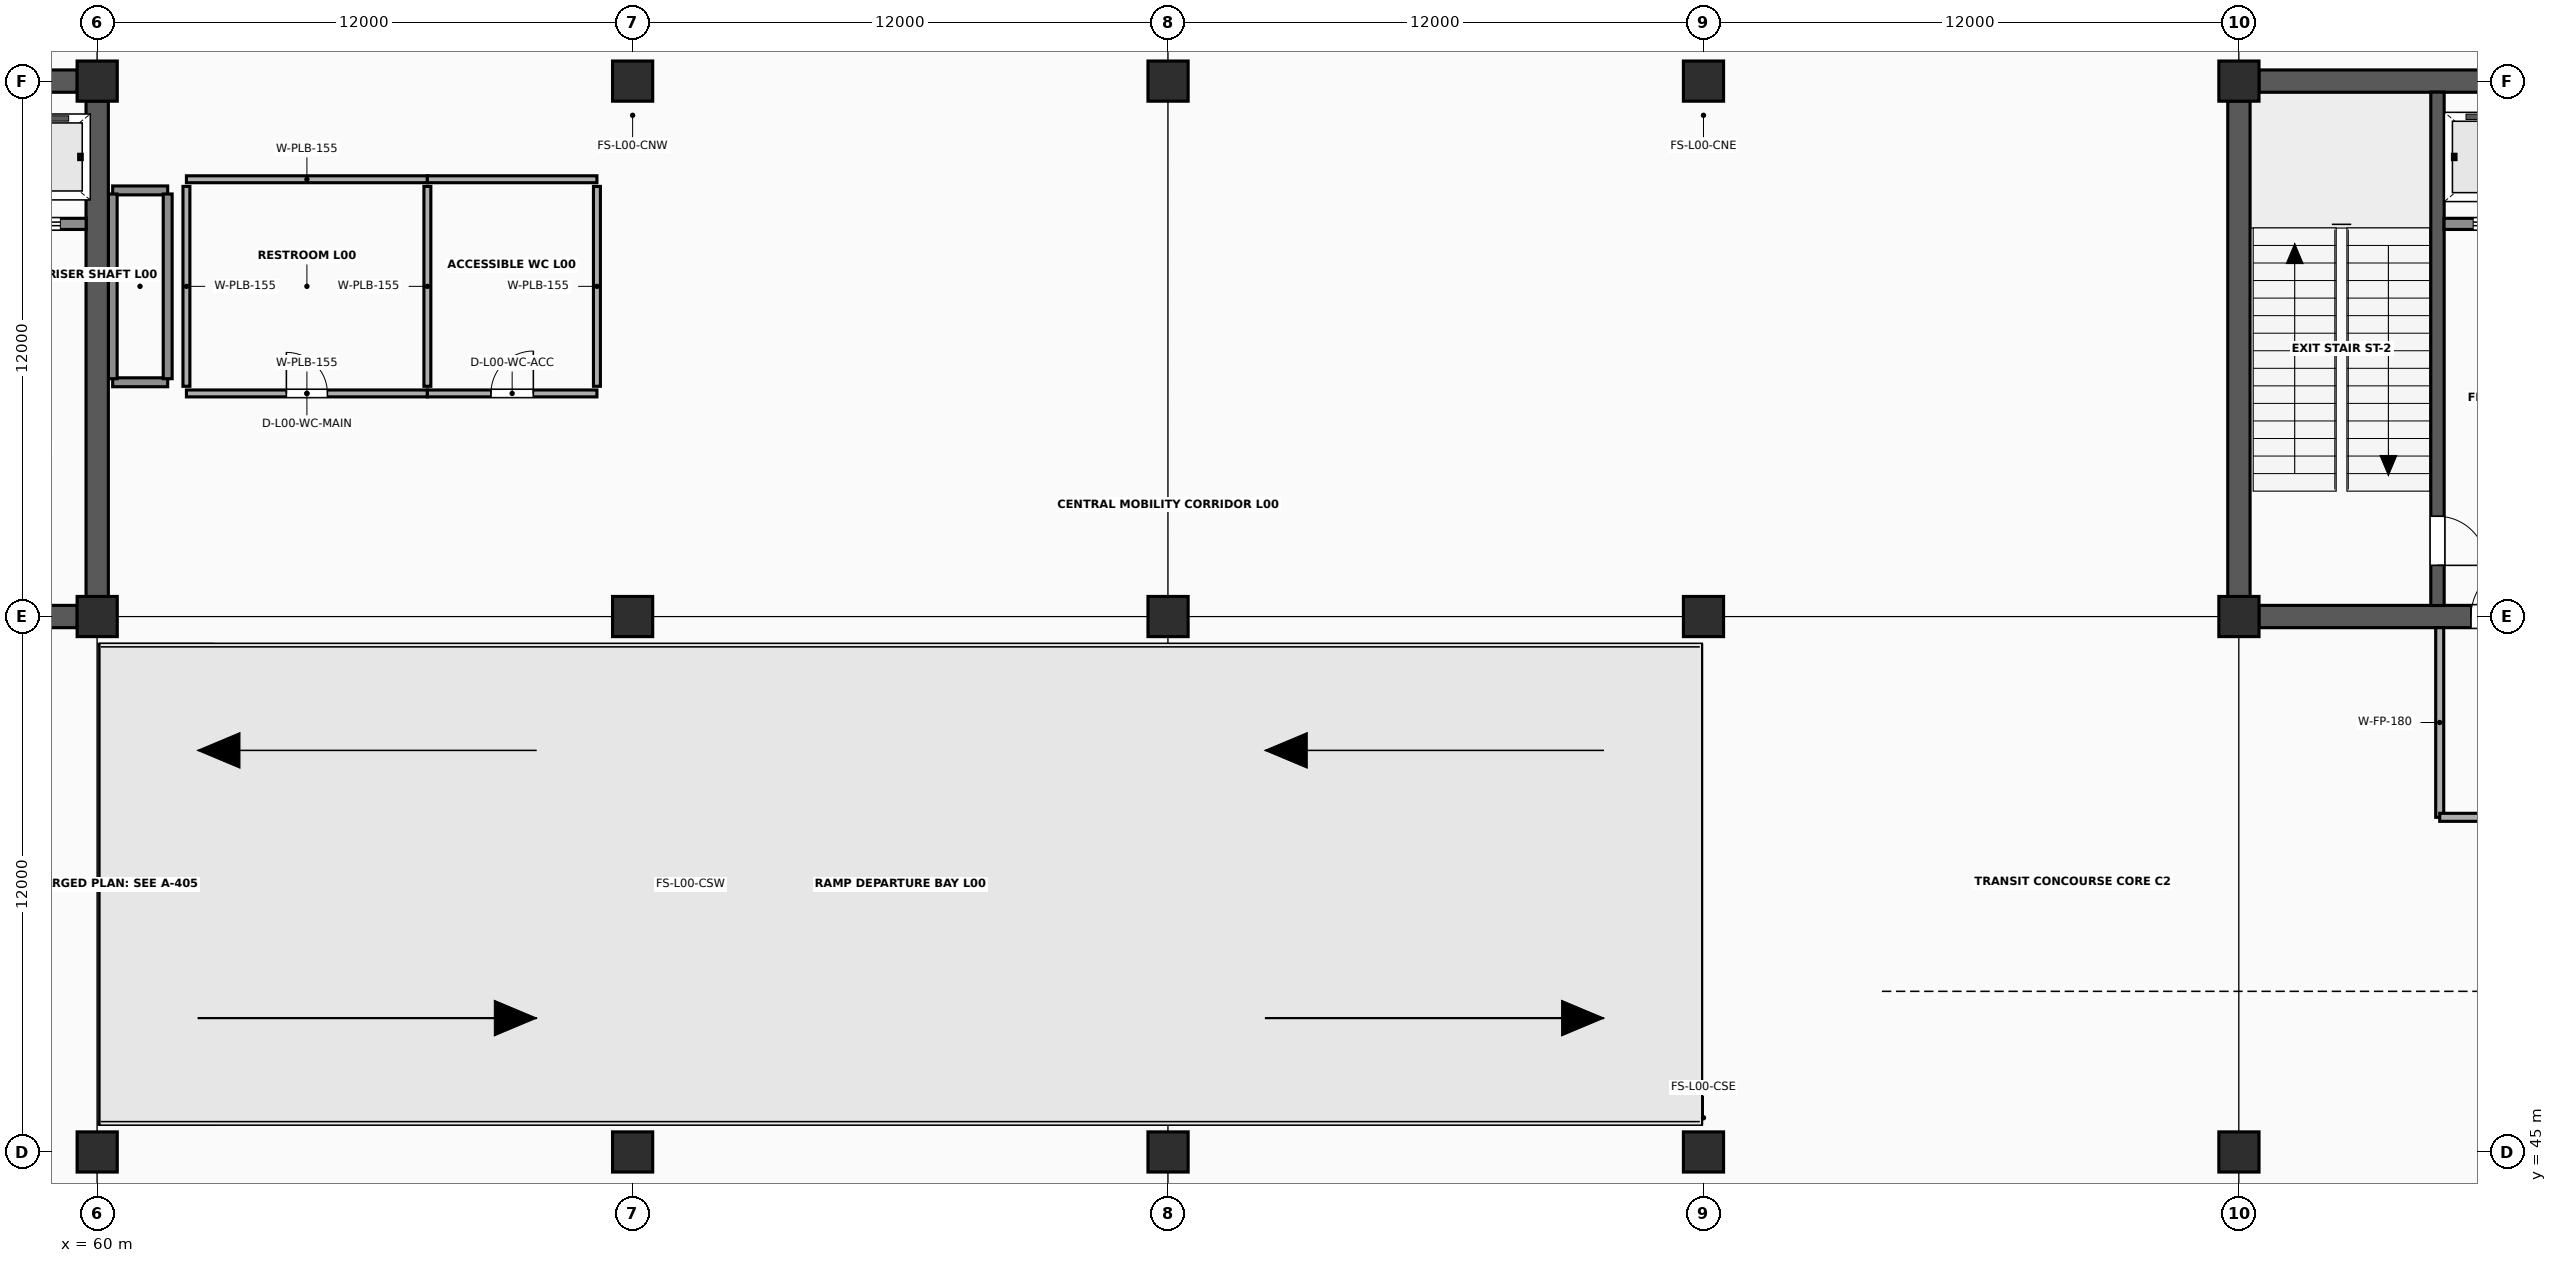
"""IFC4 building model, lengths in metres.
Left out: names, types, materials, properties, quantities, classifications, styles, units other than length and angle.
Written with IfcOpenShell. Run it as: python <this file> out.ifc"""

import sys

from ifc_helpers import new_model, si_unit, direction, frame, frame_2d, origin, origin_2d, place, context, subcontext, project, spatial, rectangle, extrude, element, fill, save


model = new_model("IFC4")
c1 = context("Model", 3, precision=1e-05, world=origin(), true_north=direction((0.0, 1.0)))
c2 = subcontext(c1, "Body", "Model", "MODEL_VIEW")
j1 = project(units=[si_unit("LENGTHUNIT", "METRE"), si_unit("PLANEANGLEUNIT", "RADIAN")], contexts=[c1])
p1 = place(None, origin())
s1 = spatial("IfcSite", under=j1, at=p1, CompositionType="ELEMENT")
p2 = place(p1, origin())
s2 = spatial("IfcBuilding", under=s1, at=p2, CompositionType="ELEMENT")
p3 = place(p2, origin())
s3 = spatial("IfcBuildingStorey", under=s2, at=p3, CompositionType="ELEMENT", Elevation=0.0)
for number, where, z_axis, x_axis in (
    (1, (60.0, 45.0, 0.0), (0.0, 0.0, 1.0), (1.0, 0.0, 0.0)),
    (2, (60.0, 57.0, 0.0), (0.0, 0.0, 1.0), (1.0, 0.0, 0.0)),
    (3, (60.0, 69.0, 0.0), (0.0, 0.0, 1.0), (1.0, 0.0, 0.0)),
    (4, (72.0, 45.0, 0.0), (0.0, 0.0, 1.0), (1.0, 0.0, 0.0)),
    (5, (72.0, 57.0, 0.0), (0.0, 0.0, 1.0), (1.0, 0.0, 0.0)),
    (6, (72.0, 69.0, 0.0), (0.0, 0.0, 1.0), (1.0, 0.0, 0.0)),
    (7, (84.0, 45.0, 0.0), (0.0, 0.0, 1.0), (1.0, 0.0, 0.0)),
    (8, (84.0, 57.0, 0.0), (0.0, 0.0, 1.0), (1.0, 0.0, 0.0)),
    (9, (84.0, 69.0, 0.0), (0.0, 0.0, 1.0), (1.0, 0.0, 0.0)),
    (10, (96.0, 45.0, 0.0), (0.0, 0.0, 1.0), (1.0, 0.0, 0.0)),
    (11, (96.0, 57.0, 0.0), (0.0, 0.0, 1.0), (1.0, 0.0, 0.0)),
    (12, (96.0, 69.0, 0.0), (0.0, 0.0, 1.0), (1.0, 0.0, 0.0)),
    (13, (108.0, 45.0, 0.0), (0.0, 0.0, 1.0), (1.0, 0.0, 0.0)),
    (14, (108.0, 57.0, 0.0), (0.0, 0.0, 1.0), (1.0, 0.0, 0.0)),
    (15, (108.0, 69.0, 0.0), (0.0, 0.0, 1.0), (1.0, 0.0, 0.0)),
):
    element("IfcColumn", number, at=place(p3, frame(where, z_axis=z_axis, x_axis=x_axis)), inside=s3, PredefinedType="COLUMN", context=c2, shape_type="SweptSolid", body=[
        extrude(rectangle(XDim=0.9, YDim=0.9, at=origin_2d()), origin(), (0.0, 0.0, 1.0), 5.4),
    ])
for number, where, z_axis, x_axis in (
    (16, (60.347, 62.25, 0.0), (0.0, 0.0, 1.0), (1.0, 0.0, 0.0)),
    (17, (60.347, 66.55, 0.0), (0.0, 0.0, 1.0), (1.0, 0.0, 0.0)),
):
    element("IfcWall", number, at=place(p3, frame(where, z_axis=z_axis, x_axis=x_axis)), inside=s3, PredefinedType="SOLIDWALL", context=c2, shape_type="SweptSolid", body=[
        extrude(rectangle(XDim=1.233, YDim=0.2, at=frame_2d((0.617, 0.0))), origin(), (0.0, 0.0, 1.0), 5.203),
    ])
for number, where, z_axis, x_axis in (
    (18, (60.347, 62.33, 0.0), (0.0, 0.0, 1.0), (0.0, 1.0, 0.0)),
    (19, (61.58, 62.33, 0.0), (0.0, 0.0, 1.0), (0.0, 1.0, 0.0)),
):
    element("IfcWall", number, at=place(p3, frame(where, z_axis=z_axis, x_axis=x_axis)), inside=s3, PredefinedType="SOLIDWALL", context=c2, shape_type="SweptSolid", body=[
        extrude(rectangle(XDim=4.14, YDim=0.2, at=frame_2d((2.07, 0.0))), origin(), (0.0, 0.0, 1.0), 5.203),
    ])
p4 = place(p3, frame((48.447, 57.0, 0.0), z_axis=(0.0, 0.0, 1.0), x_axis=(1.0, 0.0, 0.0)))
e20 = element("IfcWall", 20, at=p4, inside=s3, PredefinedType="SHEAR", context=c2, shape_type="SweptSolid", body=[
    extrude(rectangle(XDim=11.106, YDim=0.5, at=frame_2d((5.553, 0.0))), origin(), (0.0, 0.0, 1.0), 5.203),
])
p5 = place(p4, frame((4.753, 0.0, 0.0)))
e21 = element("IfcOpeningElement", 21, at=p5, cuts=e20, PredefinedType="OPENING", context=c2, shape_type="SweptSolid", body=[
    extrude(rectangle(XDim=1.2, YDim=2.2, at=frame_2d((0.6, 1.1))), frame((0.0, 0.265, 0.0), z_axis=(0.0, -1.0, 0.0), x_axis=(1.0, 0.0, 0.0)), (0.0, 0.0, 1.0), 0.53),
])
p6 = place(p4, frame((8.453, 0.0, 0.0)))
e22 = element("IfcOpeningElement", 22, at=p6, cuts=e20, PredefinedType="OPENING", context=c2, shape_type="SweptSolid", body=[
    extrude(rectangle(XDim=1.5, YDim=2.25, at=frame_2d((0.75, 1.125))), frame((0.0, 0.265, 0.0), z_axis=(0.0, -1.0, 0.0), x_axis=(1.0, 0.0, 0.0)), (0.0, 0.0, 1.0), 0.53),
])
for number, where, z_axis, x_axis in (
    (23, (48.447, 69.0, 0.0), (0.0, 0.0, 1.0), (1.0, 0.0, 0.0)),
    (24, (60.0, 57.447, 0.0), (0.0, 0.0, 1.0), (0.0, 1.0, 0.0)),
):
    element("IfcWall", number, at=place(p3, frame(where, z_axis=z_axis, x_axis=x_axis)), inside=s3, PredefinedType="SHEAR", context=c2, shape_type="SweptSolid", body=[
        extrude(rectangle(XDim=11.106, YDim=0.5, at=frame_2d((5.553, 0.0))), origin(), (0.0, 0.0, 1.0), 5.203),
    ])
p7 = place(p3, frame((52.597, 65.8, 0.0), z_axis=(0.0, 0.0, 1.0), x_axis=(1.0, 0.0, 0.0)))
e25 = element("IfcWall", 25, at=p7, inside=s3, PredefinedType="SOLIDWALL", context=c2, shape_type="SweptSolid", body=[
    extrude(rectangle(XDim=7.156, YDim=0.25, at=frame_2d((3.578, 0.0))), origin(), (0.0, 0.0, 1.0), 5.203),
])
p8 = place(p7, frame((0.653, 0.0, 0.0)))
e26 = element("IfcOpeningElement", 26, at=p8, cuts=e25, PredefinedType="OPENING", context=c2, shape_type="SweptSolid", body=[
    extrude(rectangle(XDim=1.1, YDim=2.24, at=frame_2d((0.55, 1.12))), frame((0.0, 0.14, 0.0), z_axis=(0.0, -1.0, 0.0), x_axis=(1.0, 0.0, 0.0)), (0.0, 0.0, 1.0), 0.28),
])
p9 = place(p7, frame((3.153, 0.0, 0.0)))
e27 = element("IfcOpeningElement", 27, at=p9, cuts=e25, PredefinedType="OPENING", context=c2, shape_type="SweptSolid", body=[
    extrude(rectangle(XDim=1.05, YDim=2.2, at=frame_2d((0.525, 1.1))), frame((0.0, 0.14, 0.0), z_axis=(0.0, -1.0, 0.0), x_axis=(1.0, 0.0, 0.0)), (0.0, 0.0, 1.0), 0.28),
])
p10 = place(p7, frame((5.528, 0.0, 0.0)))
e28 = element("IfcOpeningElement", 28, at=p10, cuts=e25, PredefinedType="OPENING", context=c2, shape_type="SweptSolid", body=[
    extrude(rectangle(XDim=1.05, YDim=2.2, at=frame_2d((0.525, 1.1))), frame((0.0, 0.14, 0.0), z_axis=(0.0, -1.0, 0.0), x_axis=(1.0, 0.0, 0.0)), (0.0, 0.0, 1.0), 0.28),
])
p11 = place(p3, frame((108.447, 57.0, 0.0), z_axis=(0.0, 0.0, 1.0), x_axis=(1.0, 0.0, 0.0)))
e29 = element("IfcWall", 29, at=p11, inside=s3, PredefinedType="SHEAR", context=c2, shape_type="SweptSolid", body=[
    extrude(rectangle(XDim=11.106, YDim=0.5, at=frame_2d((5.553, 0.0))), origin(), (0.0, 0.0, 1.0), 5.203),
])
p12 = place(p11, frame((4.753, 0.0, 0.0)))
e30 = element("IfcOpeningElement", 30, at=p12, cuts=e29, PredefinedType="OPENING", context=c2, shape_type="SweptSolid", body=[
    extrude(rectangle(XDim=1.2, YDim=2.2, at=frame_2d((0.6, 1.1))), frame((0.0, 0.265, 0.0), z_axis=(0.0, -1.0, 0.0), x_axis=(1.0, 0.0, 0.0)), (0.0, 0.0, 1.0), 0.53),
])
p13 = place(p11, frame((8.453, 0.0, 0.0)))
e31 = element("IfcOpeningElement", 31, at=p13, cuts=e29, PredefinedType="OPENING", context=c2, shape_type="SweptSolid", body=[
    extrude(rectangle(XDim=1.5, YDim=2.25, at=frame_2d((0.75, 1.125))), frame((0.0, 0.265, 0.0), z_axis=(0.0, -1.0, 0.0), x_axis=(1.0, 0.0, 0.0)), (0.0, 0.0, 1.0), 0.53),
])
for number, where, z_axis, x_axis in (
    (32, (108.447, 69.0, 0.0), (0.0, 0.0, 1.0), (1.0, 0.0, 0.0)),
    (33, (108.0, 57.447, 0.0), (0.0, 0.0, 1.0), (0.0, 1.0, 0.0)),
):
    element("IfcWall", number, at=place(p3, frame(where, z_axis=z_axis, x_axis=x_axis)), inside=s3, PredefinedType="SHEAR", context=c2, shape_type="SweptSolid", body=[
        extrude(rectangle(XDim=11.106, YDim=0.5, at=frame_2d((5.553, 0.0))), origin(), (0.0, 0.0, 1.0), 5.203),
    ])
p14 = place(p3, frame((112.45, 57.247, 0.0), z_axis=(0.0, 0.0, 1.0), x_axis=(0.0, 1.0, 0.0)))
e34 = element("IfcWall", 34, at=p14, inside=s3, PredefinedType="SHEAR", context=c2, shape_type="SweptSolid", body=[
    extrude(rectangle(XDim=11.506, YDim=0.3, at=frame_2d((5.753, 0.0))), origin(), (0.0, 0.0, 1.0), 5.203),
])
p15 = place(p14, frame((0.9, 0.0, 0.0)))
e35 = element("IfcOpeningElement", 35, at=p15, cuts=e34, PredefinedType="OPENING", context=c2, shape_type="SweptSolid", body=[
    extrude(rectangle(XDim=1.1, YDim=2.2, at=frame_2d((0.55, 1.1))), frame((0.0, 0.165, 0.0), z_axis=(0.0, -1.0, 0.0), x_axis=(1.0, 0.0, 0.0)), (0.0, 0.0, 1.0), 0.33),
])
p16 = place(p3, frame((112.597, 65.8, 0.0), z_axis=(0.0, 0.0, 1.0), x_axis=(1.0, 0.0, 0.0)))
e36 = element("IfcWall", 36, at=p16, inside=s3, PredefinedType="SOLIDWALL", context=c2, shape_type="SweptSolid", body=[
    extrude(rectangle(XDim=7.156, YDim=0.25, at=frame_2d((3.578, 0.0))), origin(), (0.0, 0.0, 1.0), 5.203),
])
p17 = place(p16, frame((0.653, 0.0, 0.0)))
e37 = element("IfcOpeningElement", 37, at=p17, cuts=e36, PredefinedType="OPENING", context=c2, shape_type="SweptSolid", body=[
    extrude(rectangle(XDim=1.1, YDim=2.24, at=frame_2d((0.55, 1.12))), frame((0.0, 0.14, 0.0), z_axis=(0.0, -1.0, 0.0), x_axis=(1.0, 0.0, 0.0)), (0.0, 0.0, 1.0), 0.28),
])
p18 = place(p16, frame((3.153, 0.0, 0.0)))
e38 = element("IfcOpeningElement", 38, at=p18, cuts=e36, PredefinedType="OPENING", context=c2, shape_type="SweptSolid", body=[
    extrude(rectangle(XDim=1.05, YDim=2.2, at=frame_2d((0.525, 1.1))), frame((0.0, 0.14, 0.0), z_axis=(0.0, -1.0, 0.0), x_axis=(1.0, 0.0, 0.0)), (0.0, 0.0, 1.0), 0.28),
])
p19 = place(p16, frame((5.528, 0.0, 0.0)))
e39 = element("IfcOpeningElement", 39, at=p19, cuts=e36, PredefinedType="OPENING", context=c2, shape_type="SweptSolid", body=[
    extrude(rectangle(XDim=1.05, YDim=2.2, at=frame_2d((0.525, 1.1))), frame((0.0, 0.14, 0.0), z_axis=(0.0, -1.0, 0.0), x_axis=(1.0, 0.0, 0.0)), (0.0, 0.0, 1.0), 0.28),
])
p20 = place(p3, frame((112.5, 52.5, 0.0), z_axis=(0.0, 0.0, 1.0), x_axis=(0.0, 1.0, 0.0)))
e40 = element("IfcWall", 40, at=p20, inside=s3, PredefinedType="SOLIDWALL", context=c2, shape_type="SweptSolid", body=[
    extrude(rectangle(XDim=4.25, YDim=0.18, at=frame_2d((2.125, 0.0))), origin(), (0.0, 0.0, 1.0), 2.6),
])
p21 = place(p3, frame((112.5, 52.5, 0.0), z_axis=(0.0, 0.0, 1.0), x_axis=(1.0, 0.0, 0.0)))
e41 = element("IfcWall", 41, at=p21, inside=s3, PredefinedType="SOLIDWALL", context=c2, shape_type="SweptSolid", body=[
    extrude(rectangle(XDim=12.45, YDim=0.18, at=frame_2d((6.225, 0.0))), origin(), (0.0, 0.0, 1.0), 2.6),
])
p22 = place(p21, frame((4.4, 0.0, 0.0)))
e42 = element("IfcOpeningElement", 42, at=p22, cuts=e41, PredefinedType="OPENING", context=c2, shape_type="SweptSolid", body=[
    extrude(rectangle(XDim=1.2, YDim=2.2, at=frame_2d((0.6, 1.1))), frame((0.0, 0.105, 0.0), z_axis=(0.0, -1.0, 0.0), x_axis=(1.0, 0.0, 0.0)), (0.0, 0.0, 1.0), 0.21),
])
p23 = place(p3, frame((62.0, 62.0, 0.0), z_axis=(0.0, 0.0, 1.0), x_axis=(1.0, 0.0, 0.0)))
e43 = element("IfcWall", 43, at=p23, inside=s3, PredefinedType="PLUMBINGWALL", context=c2, shape_type="SweptSolid", body=[
    extrude(rectangle(XDim=5.4, YDim=0.155, at=frame_2d((2.7, 0.0))), origin(), (0.0, 0.0, 1.0), 2.75),
])
p24 = place(p23, frame((2.24, 0.0, 0.0)))
e44 = element("IfcOpeningElement", 44, at=p24, cuts=e43, PredefinedType="OPENING", context=c2, shape_type="SweptSolid", body=[
    extrude(rectangle(XDim=0.92, YDim=2.1, at=frame_2d((0.46, 1.05))), frame((0.0, 0.093, 0.0), z_axis=(0.0, -1.0, 0.0), x_axis=(1.0, 0.0, 0.0)), (0.0, 0.0, 1.0), 0.185),
])
p25 = place(p3, frame((62.0, 66.8, 0.0), z_axis=(0.0, 0.0, 1.0), x_axis=(1.0, 0.0, 0.0)))
e45 = element("IfcWall", 45, at=p25, inside=s3, PredefinedType="PLUMBINGWALL", context=c2, shape_type="SweptSolid", body=[
    extrude(rectangle(XDim=5.4, YDim=0.155, at=frame_2d((2.7, 0.0))), origin(), (0.0, 0.0, 1.0), 2.75),
])
for number, where, z_axis, x_axis in (
    (46, (62.0, 62.16, 0.0), (0.0, 0.0, 1.0), (0.0, 1.0, 0.0)),
    (47, (67.4, 62.16, 0.0), (0.0, 0.0, 1.0), (0.0, 1.0, 0.0)),
):
    element("IfcWall", number, at=place(p3, frame(where, z_axis=z_axis, x_axis=x_axis)), inside=s3, PredefinedType="PLUMBINGWALL", context=c2, shape_type="SweptSolid", body=[
        extrude(rectangle(XDim=4.48, YDim=0.155, at=frame_2d((2.24, 0.0))), origin(), (0.0, 0.0, 1.0), 2.75),
    ])
p26 = place(p3, frame((67.4, 62.0, 0.0), z_axis=(0.0, 0.0, 1.0), x_axis=(1.0, 0.0, 0.0)))
e48 = element("IfcWall", 48, at=p26, inside=s3, PredefinedType="PLUMBINGWALL", context=c2, shape_type="SweptSolid", body=[
    extrude(rectangle(XDim=3.8, YDim=0.155, at=frame_2d((1.9, 0.0))), origin(), (0.0, 0.0, 1.0), 2.75),
])
p27 = place(p26, frame((1.425, 0.0, 0.0)))
e49 = element("IfcOpeningElement", 49, at=p27, cuts=e48, PredefinedType="OPENING", context=c2, shape_type="SweptSolid", body=[
    extrude(rectangle(XDim=0.95, YDim=2.13, at=frame_2d((0.475, 1.065))), frame((0.0, 0.093, 0.0), z_axis=(0.0, -1.0, 0.0), x_axis=(1.0, 0.0, 0.0)), (0.0, 0.0, 1.0), 0.185),
])
p28 = place(p3, frame((67.4, 66.8, 0.0), z_axis=(0.0, 0.0, 1.0), x_axis=(1.0, 0.0, 0.0)))
e50 = element("IfcWall", 50, at=p28, inside=s3, PredefinedType="PLUMBINGWALL", context=c2, shape_type="SweptSolid", body=[
    extrude(rectangle(XDim=3.8, YDim=0.155, at=frame_2d((1.9, 0.0))), origin(), (0.0, 0.0, 1.0), 2.75),
])
p29 = place(p3, frame((71.2, 62.16, 0.0), z_axis=(0.0, 0.0, 1.0), x_axis=(0.0, 1.0, 0.0)))
e51 = element("IfcWall", 51, at=p29, inside=s3, PredefinedType="PLUMBINGWALL", context=c2, shape_type="SweptSolid", body=[
    extrude(rectangle(XDim=4.48, YDim=0.155, at=frame_2d((2.24, 0.0))), origin(), (0.0, 0.0, 1.0), 2.75),
])
p30 = place(p10, origin())
e52 = element("IfcDoor", 52, at=p30, inside=s3, OperationType="SLIDING_TO_LEFT", PredefinedType="USERDEFINED", context=c2, shape_type="SweptSolid", body=[
    extrude(rectangle(XDim=1.05, YDim=2.2, at=frame_2d((0.525, 1.1))), frame((0.0, 0.025, 0.0), z_axis=(0.0, -1.0, 0.0), x_axis=(1.0, 0.0, 0.0)), (0.0, 0.0, 1.0), 0.05),
])
fill(e28, e52)
p31 = place(p15, origin())
e53 = element("IfcDoor", 53, at=p31, inside=s3, OperationType="SINGLE_SWING_LEFT", PredefinedType="DOOR", context=c2, shape_type="SweptSolid", body=[
    extrude(rectangle(XDim=1.1, YDim=2.2, at=frame_2d((0.55, 1.1))), frame((0.0, 0.025, 0.0), z_axis=(0.0, -1.0, 0.0), x_axis=(1.0, 0.0, 0.0)), (0.0, 0.0, 1.0), 0.05),
])
fill(e35, e53)
p32 = place(p12, frame((1.2, 0.0, 0.0), z_axis=(0.0, 0.0, 1.0), x_axis=(-1.0, 0.0, 0.0)))
e54 = element("IfcDoor", 54, at=p32, inside=s3, OperationType="SINGLE_SWING_RIGHT", PredefinedType="DOOR", context=c2, shape_type="SweptSolid", body=[
    extrude(rectangle(XDim=1.2, YDim=2.2, at=frame_2d((0.6, 1.1))), frame((0.0, 0.025, 0.0), z_axis=(0.0, -1.0, 0.0), x_axis=(1.0, 0.0, 0.0)), (0.0, 0.0, 1.0), 0.05),
])
fill(e30, e54)
p33 = place(p17, origin())
e55 = element("IfcDoor", 55, at=p33, inside=s3, OperationType="SLIDING_TO_LEFT", PredefinedType="USERDEFINED", context=c2, shape_type="SweptSolid", body=[
    extrude(rectangle(XDim=1.1, YDim=2.24, at=frame_2d((0.55, 1.12))), frame((0.0, 0.025, 0.0), z_axis=(0.0, -1.0, 0.0), x_axis=(1.0, 0.0, 0.0)), (0.0, 0.0, 1.0), 0.05),
])
fill(e37, e55)
p34 = place(p24, origin())
e56 = element("IfcDoor", 56, at=p34, inside=s3, OperationType="SINGLE_SWING_LEFT", PredefinedType="DOOR", context=c2, shape_type="SweptSolid", body=[
    extrude(rectangle(XDim=0.92, YDim=2.1, at=frame_2d((0.46, 1.05))), frame((0.0, 0.025, 0.0), z_axis=(0.0, -1.0, 0.0), x_axis=(1.0, 0.0, 0.0)), (0.0, 0.0, 1.0), 0.05),
])
fill(e44, e56)
p35 = place(p27, origin())
e57 = element("IfcDoor", 57, at=p35, inside=s3, OperationType="SINGLE_SWING_RIGHT", PredefinedType="DOOR", context=c2, shape_type="SweptSolid", body=[
    extrude(rectangle(XDim=0.95, YDim=2.13, at=frame_2d((0.475, 1.065))), frame((0.0, 0.025, 0.0), z_axis=(0.0, -1.0, 0.0), x_axis=(1.0, 0.0, 0.0)), (0.0, 0.0, 1.0), 0.05),
])
fill(e49, e57)
save(model, sys.argv[1])
